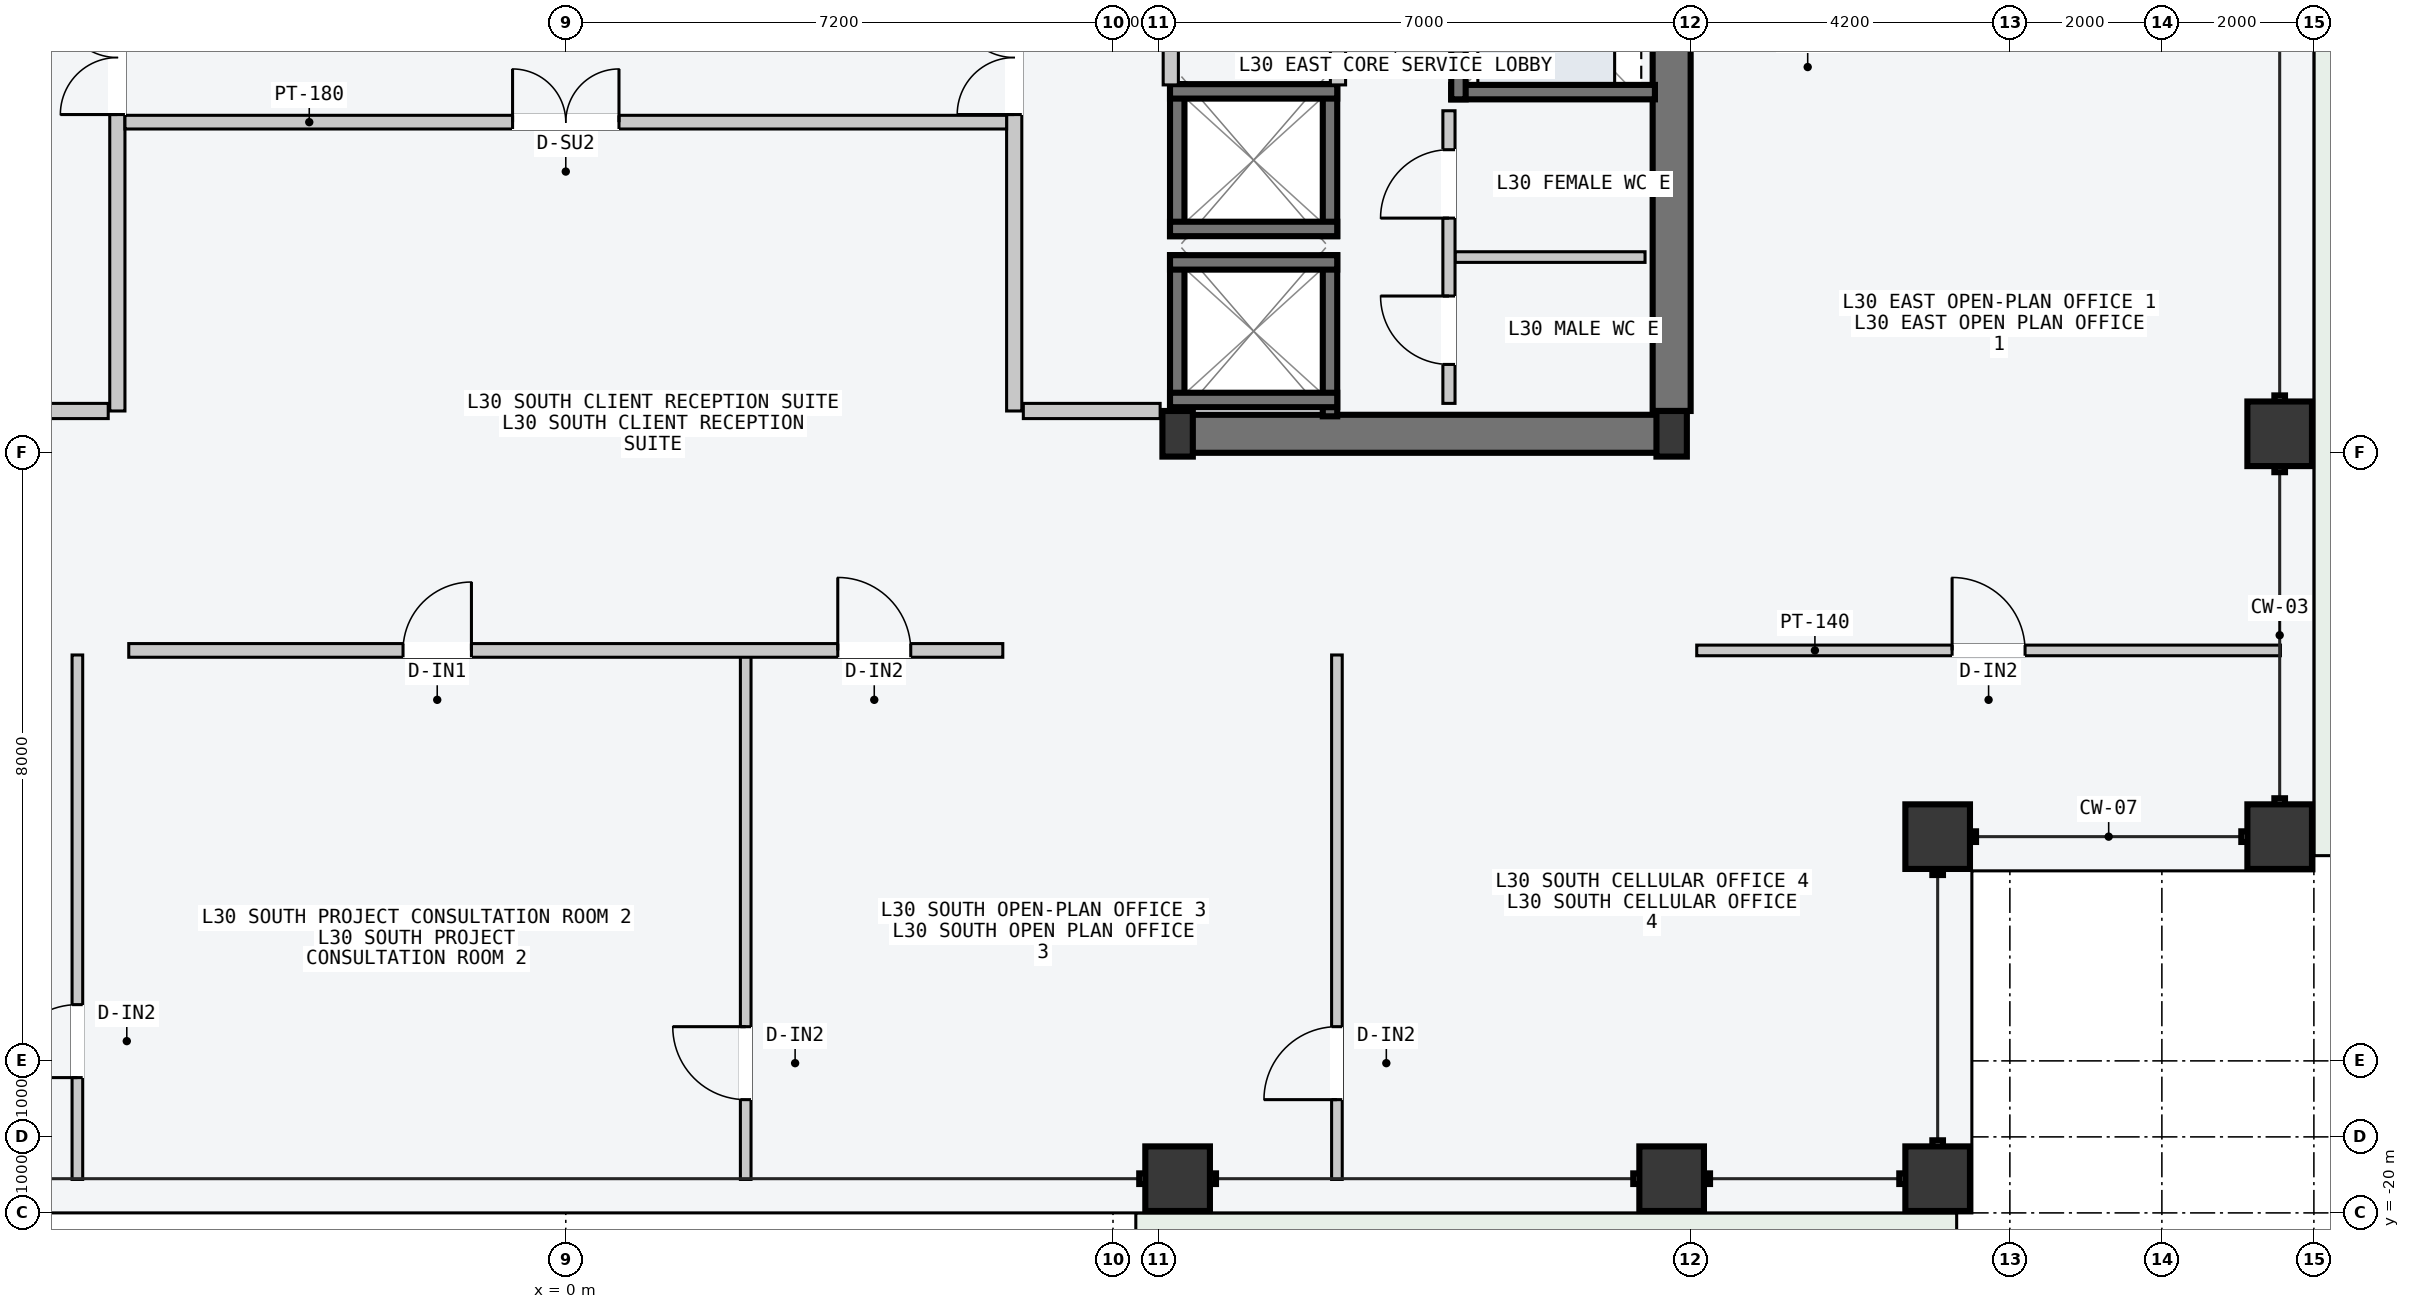
"""IFC4 building model, lengths in metres.
Left out: names, types, materials, properties, quantities, classifications, styles, units other than length and angle.
Written with IfcOpenShell. Run it as: python <this file> out.ifc"""

import sys

from ifc_helpers import new_model, si_unit, direction, frame, frame_2d, origin, origin_2d, place, context, subcontext, project, spatial, rectangle, hollow_rectangle, i_section, extrude, element, fill, save


model = new_model("IFC4")
c1 = context("Model", 3, precision=1e-05, world=origin(), true_north=direction((0.0, 1.0)))
c2 = subcontext(c1, "Body", "Model", "MODEL_VIEW")
j1 = project(units=[si_unit("LENGTHUNIT", "METRE"), si_unit("PLANEANGLEUNIT", "RADIAN")], contexts=[c1])
p1 = place(None, origin())
s1 = spatial("IfcSite", under=j1, at=p1, CompositionType="ELEMENT")
p2 = place(p1, origin())
s2 = spatial("IfcBuilding", under=s1, at=p2, CompositionType="ELEMENT")
p3 = place(p2, frame((0.0, 0.0, 117.0)))
s3 = spatial("IfcBuildingStorey", under=s2, at=p3, CompositionType="ELEMENT", Elevation=117.0)
p4 = place(p3, frame((8.07, -9.75, -0.2), z_axis=(0.0, 0.0, 1.0), x_axis=(1.0, 0.0, 0.0)))
e1 = element("IfcWall", 1, at=p4, inside=s3, PredefinedType="SHEAR", context=c2, shape_type="SweptSolid", body=[
    extrude(rectangle(XDim=6.46, YDim=0.5, at=frame_2d((3.23, 0.0))), origin(), (0.0, 0.0, 1.0), 3.6),
])
p5 = place(p3, frame((14.55, -9.45, -0.2), z_axis=(0.0, 0.0, 1.0), x_axis=(0.0, 1.0, 0.0)))
e2 = element("IfcWall", 2, at=p5, inside=s3, PredefinedType="SHEAR", context=c2, shape_type="SweptSolid", body=[
    extrude(rectangle(XDim=9.15, YDim=0.5, at=frame_2d((4.575, 0.0))), origin(), (0.0, 0.0, 1.0), 3.6),
])
for number, where, z_axis, x_axis in (
    (3, (8.05, -9.75, 0.0), (0.0, 0.0, 1.0), (1.0, 0.0, 0.0)),
    (4, (14.55, -9.75, 0.0), (0.0, 0.0, 1.0), (1.0, 0.0, 0.0)),
):
    element("IfcColumn", number, at=place(p3, frame(where, z_axis=z_axis, x_axis=x_axis)), inside=s3, PredefinedType="COLUMN", context=c2, shape_type="SweptSolid", body=[
        extrude(i_section(OverallWidth=0.4, OverallDepth=0.6, WebThickness=0.022, FlangeThickness=0.036, at=origin_2d()), origin(), (0.0, 0.0, 1.0), 3.6),
    ])
for number, where, z_axis, x_axis in (
    (5, (8.05, -19.55, 0.0), (0.0, 0.0, 1.0), (1.0, 0.0, 0.0)),
    (6, (14.55, -19.55, 0.0), (0.0, 0.0, 1.0), (1.0, 0.0, 0.0)),
    (7, (18.05, -19.55, 0.0), (0.0, 0.0, 1.0), (1.0, 0.0, 0.0)),
    (8, (22.55, -15.05, 0.0), (0.0, 0.0, 1.0), (0.0, 1.0, 0.0)),
    (9, (22.55, -9.75, 0.0), (0.0, 0.0, 1.0), (0.0, 1.0, 0.0)),
    (10, (18.05, -15.05, 0.0), (0.0, 0.0, 1.0), (1.0, 0.0, 0.0)),
):
    element("IfcColumn", number, at=place(p3, frame(where, z_axis=z_axis, x_axis=x_axis)), inside=s3, PredefinedType="COLUMN", context=c2, shape_type="SweptSolid", body=[
        extrude(hollow_rectangle(XDim=0.85, YDim=0.85, WallThickness=0.04, at=origin_2d()), origin(), (0.0, 0.0, 1.0), 3.6),
    ])
for number, where, z_axis, x_axis in (
    (11, (8.045, -9.52, -0.2), (0.0, 0.0, 1.0), (0.0, 1.0, 0.0)),
    (12, (10.055, -9.52, -0.2), (0.0, 0.0, 1.0), (0.0, 1.0, 0.0)),
):
    element("IfcWall", number, at=place(p3, frame(where, z_axis=z_axis, x_axis=x_axis)), inside=s3, PredefinedType="SOLIDWALL", context=c2, shape_type="SweptSolid", body=[
        extrude(rectangle(XDim=2.12, YDim=0.19, at=frame_2d((1.06, 0.0))), origin(), (0.0, 0.0, 1.0), 3.6),
    ])
for number, where, z_axis, x_axis in (
    (13, (7.95, -7.495, -0.2), (0.0, 0.0, 1.0), (1.0, 0.0, 0.0)),
    (14, (7.95, -9.305, -0.2), (0.0, 0.0, 1.0), (1.0, 0.0, 0.0)),
):
    element("IfcWall", number, at=place(p3, frame(where, z_axis=z_axis, x_axis=x_axis)), inside=s3, PredefinedType="SOLIDWALL", context=c2, shape_type="SweptSolid", body=[
        extrude(rectangle(XDim=2.2, YDim=0.19, at=frame_2d((1.1, 0.0))), origin(), (0.0, 0.0, 1.0), 3.6),
    ])
for number, where, z_axis, x_axis in (
    (15, (8.045, -7.15, -0.2), (0.0, 0.0, 1.0), (0.0, 1.0, 0.0)),
    (16, (10.055, -7.15, -0.2), (0.0, 0.0, 1.0), (0.0, 1.0, 0.0)),
):
    element("IfcWall", number, at=place(p3, frame(where, z_axis=z_axis, x_axis=x_axis)), inside=s3, PredefinedType="SOLIDWALL", context=c2, shape_type="SweptSolid", body=[
        extrude(rectangle(XDim=2.0, YDim=0.19, at=frame_2d((1.0, 0.0))), origin(), (0.0, 0.0, 1.0), 3.6),
    ])
for number, where, z_axis, x_axis in (
    (17, (7.95, -5.245, -0.2), (0.0, 0.0, 1.0), (1.0, 0.0, 0.0)),
    (18, (7.95, -7.055, -0.2), (0.0, 0.0, 1.0), (1.0, 0.0, 0.0)),
):
    element("IfcWall", number, at=place(p3, frame(where, z_axis=z_axis, x_axis=x_axis)), inside=s3, PredefinedType="SOLIDWALL", context=c2, shape_type="SweptSolid", body=[
        extrude(rectangle(XDim=2.2, YDim=0.19, at=frame_2d((1.1, 0.0))), origin(), (0.0, 0.0, 1.0), 3.6),
    ])
p6 = place(p3, frame((11.65, -5.255, -0.2), z_axis=(0.0, 0.0, 1.0), x_axis=(1.0, 0.0, 0.0)))
e19 = element("IfcWall", 19, at=p6, inside=s3, PredefinedType="SOLIDWALL", context=c2, shape_type="SweptSolid", body=[
    extrude(rectangle(XDim=2.68, YDim=0.19, at=frame_2d((1.34, 0.0))), origin(), (0.0, 0.0, 1.0), 3.6),
])
p7 = place(p3, frame((11.745, -5.35, -0.2), z_axis=(0.0, 0.0, 1.0), x_axis=(0.0, 1.0, 0.0)))
e20 = element("IfcWall", 20, at=p7, inside=s3, PredefinedType="SOLIDWALL", context=c2, shape_type="SweptSolid", body=[
    extrude(rectangle(XDim=2.6, YDim=0.19, at=frame_2d((1.3, 0.0))), origin(), (0.0, 0.0, 1.0), 3.6),
])
p8 = place(p3, frame((-5.9, -9.45, 0.0), z_axis=(0.0, 0.0, 1.0), x_axis=(0.0, 1.0, 0.0)))
e21 = element("IfcWall", 21, at=p8, inside=s3, PredefinedType="PARTITIONING", context=c2, shape_type="SweptSolid", body=[
    extrude(rectangle(XDim=10.5, YDim=0.2, at=frame_2d((5.25, 0.0))), origin(), (0.0, 0.0, 1.0), 3.4),
])
p9 = place(p8, frame((3.9, 0.0, 0.0)))
e22 = element("IfcOpeningElement", 22, at=p9, cuts=e21, PredefinedType="OPENING", context=c2, shape_type="SweptSolid", body=[
    extrude(rectangle(XDim=1.5, YDim=2.2, at=frame_2d((0.75, 1.1))), frame((0.0, 0.11, 0.0), z_axis=(0.0, -1.0, 0.0), x_axis=(1.0, 0.0, 0.0)), (0.0, 0.0, 1.0), 0.22),
])
p10 = place(p3, frame((-6.02, -9.45, 0.0), z_axis=(0.0, 0.0, 1.0), x_axis=(-1.0, 0.0, 0.0)))
e23 = element("IfcWall", 23, at=p10, inside=s3, PredefinedType="PARTITIONING", context=c2, shape_type="SweptSolid", body=[
    extrude(rectangle(XDim=1.8, YDim=0.2, at=frame_2d((0.9, 0.0))), origin(), (0.0, 0.0, 1.0), 3.4),
])
p11 = place(p3, frame((5.9, -9.45, 0.0), z_axis=(0.0, 0.0, 1.0), x_axis=(0.0, 1.0, 0.0)))
e24 = element("IfcWall", 24, at=p11, inside=s3, PredefinedType="PARTITIONING", context=c2, shape_type="SweptSolid", body=[
    extrude(rectangle(XDim=18.9, YDim=0.2, at=frame_2d((9.45, 0.0))), origin(), (0.0, 0.0, 1.0), 3.4),
])
p12 = place(p11, frame((3.9, 0.0, 0.0)))
e25 = element("IfcOpeningElement", 25, at=p12, cuts=e24, PredefinedType="OPENING", context=c2, shape_type="SweptSolid", body=[
    extrude(rectangle(XDim=1.5, YDim=2.2, at=frame_2d((0.75, 1.1))), frame((0.0, 0.11, 0.0), z_axis=(0.0, -1.0, 0.0), x_axis=(1.0, 0.0, 0.0)), (0.0, 0.0, 1.0), 0.22),
])
p13 = place(p3, frame((6.02, -9.45, 0.0), z_axis=(0.0, 0.0, 1.0), x_axis=(1.0, 0.0, 0.0)))
e26 = element("IfcWall", 26, at=p13, inside=s3, PredefinedType="PARTITIONING", context=c2, shape_type="SweptSolid", body=[
    extrude(rectangle(XDim=1.8, YDim=0.2, at=frame_2d((0.9, 0.0))), origin(), (0.0, 0.0, 1.0), 3.4),
])
for number, where, z_axis, x_axis in (
    (27, (7.96, -5.16, 0.0), (0.0, 0.0, 1.0), (0.0, 1.0, 0.0)),
    (28, (10.16, -5.16, 0.0), (0.0, 0.0, 1.0), (0.0, 1.0, 0.0)),
):
    element("IfcWall", number, at=place(p3, frame(where, z_axis=z_axis, x_axis=x_axis)), inside=s3, PredefinedType="PARTITIONING", context=c2, shape_type="SweptSolid", body=[
        extrude(rectangle(XDim=2.44, YDim=0.2, at=frame_2d((1.22, 0.0))), origin(), (0.0, 0.0, 1.0), 3.4),
    ])
p14 = place(p3, frame((11.7, -7.425, 0.0), z_axis=(0.0, 0.0, 1.0), x_axis=(1.0, 0.0, 0.0)))
e29 = element("IfcWall", 29, at=p14, inside=s3, PredefinedType="PARTITIONING", context=c2, shape_type="SweptSolid", body=[
    extrude(rectangle(XDim=2.5, YDim=0.14, at=frame_2d((1.25, 0.0))), origin(), (0.0, 0.0, 1.0), 3.4),
])
p15 = place(p3, frame((11.62, -9.35, 0.0), z_axis=(0.0, 0.0, 1.0), x_axis=(0.0, 1.0, 0.0)))
e30 = element("IfcWall", 30, at=p15, inside=s3, PredefinedType="PARTITIONING", context=c2, shape_type="SweptSolid", body=[
    extrude(rectangle(XDim=3.85, YDim=0.16, at=frame_2d((1.925, 0.0))), origin(), (0.0, 0.0, 1.0), 3.4),
])
p16 = place(p15, frame((0.512, 0.0, 0.0)))
e31 = element("IfcOpeningElement", 31, at=p16, cuts=e30, PredefinedType="OPENING", context=c2, shape_type="SweptSolid", body=[
    extrude(rectangle(XDim=0.9, YDim=2.15, at=frame_2d((0.45, 1.075))), frame((0.0, 0.09, 0.0), z_axis=(0.0, -1.0, 0.0), x_axis=(1.0, 0.0, 0.0)), (0.0, 0.0, 1.0), 0.18),
])
p17 = place(p15, frame((2.438, 0.0, 0.0)))
e32 = element("IfcOpeningElement", 32, at=p17, cuts=e30, PredefinedType="OPENING", context=c2, shape_type="SweptSolid", body=[
    extrude(rectangle(XDim=0.9, YDim=2.15, at=frame_2d((0.45, 1.075))), frame((0.0, 0.09, 0.0), z_axis=(0.0, -1.0, 0.0), x_axis=(1.0, 0.0, 0.0)), (0.0, 0.0, 1.0), 0.18),
])
p18 = place(p3, frame((-5.8, -5.65, 0.0), z_axis=(0.0, 0.0, 1.0), x_axis=(1.0, 0.0, 0.0)))
e33 = element("IfcWall", 33, at=p18, inside=s3, PredefinedType="PARTITIONING", context=c2, shape_type="SweptSolid", body=[
    extrude(rectangle(XDim=11.6, YDim=0.18, at=frame_2d((5.8, 0.0))), origin(), (0.0, 0.0, 1.0), 3.4),
])
p19 = place(p18, frame((5.1, 0.0, 0.0)))
e34 = element("IfcOpeningElement", 34, at=p19, cuts=e33, PredefinedType="OPENING", context=c2, shape_type="SweptSolid", body=[
    extrude(rectangle(XDim=1.4, YDim=2.2, at=frame_2d((0.7, 1.1))), frame((0.0, 0.1, 0.0), z_axis=(0.0, -1.0, 0.0), x_axis=(1.0, 0.0, 0.0)), (0.0, 0.0, 1.0), 0.2),
])
p20 = place(p3, frame((-6.426, -19.56, 0.0), z_axis=(0.0, 0.0, 1.0), x_axis=(0.0, 1.0, 0.0)))
e35 = element("IfcWall", 35, at=p20, inside=s3, PredefinedType="PARTITIONING", context=c2, shape_type="SweptSolid", body=[
    extrude(rectangle(XDim=6.9, YDim=0.14, at=frame_2d((3.45, 0.0))), origin(), (0.0, 0.0, 1.0), 3.4),
])
p21 = place(p20, frame((1.34, 0.0, 0.0)))
e36 = element("IfcOpeningElement", 36, at=p21, cuts=e35, PredefinedType="OPENING", context=c2, shape_type="SweptSolid", body=[
    extrude(rectangle(XDim=0.96, YDim=2.18, at=frame_2d((0.48, 1.09))), frame((0.0, 0.08, 0.0), z_axis=(0.0, -1.0, 0.0), x_axis=(1.0, 0.0, 0.0)), (0.0, 0.0, 1.0), 0.16),
])
p22 = place(p3, frame((2.367, -19.56, 0.0), z_axis=(0.0, 0.0, 1.0), x_axis=(0.0, 1.0, 0.0)))
e37 = element("IfcWall", 37, at=p22, inside=s3, PredefinedType="PARTITIONING", context=c2, shape_type="SweptSolid", body=[
    extrude(rectangle(XDim=6.9, YDim=0.14, at=frame_2d((3.45, 0.0))), origin(), (0.0, 0.0, 1.0), 3.4),
])
p23 = place(p22, frame((1.05, 0.0, 0.0)))
e38 = element("IfcOpeningElement", 38, at=p23, cuts=e37, PredefinedType="OPENING", context=c2, shape_type="SweptSolid", body=[
    extrude(rectangle(XDim=0.96, YDim=2.18, at=frame_2d((0.48, 1.09))), frame((0.0, 0.08, 0.0), z_axis=(0.0, -1.0, 0.0), x_axis=(1.0, 0.0, 0.0)), (0.0, 0.0, 1.0), 0.16),
])
p24 = place(p3, frame((10.146, -19.56, 0.0), z_axis=(0.0, 0.0, 1.0), x_axis=(0.0, 1.0, 0.0)))
e39 = element("IfcWall", 39, at=p24, inside=s3, PredefinedType="PARTITIONING", context=c2, shape_type="SweptSolid", body=[
    extrude(rectangle(XDim=6.9, YDim=0.14, at=frame_2d((3.45, 0.0))), origin(), (0.0, 0.0, 1.0), 3.4),
])
p25 = place(p24, frame((1.05, 0.0, 0.0)))
e40 = element("IfcOpeningElement", 40, at=p25, cuts=e39, PredefinedType="OPENING", context=c2, shape_type="SweptSolid", body=[
    extrude(rectangle(XDim=0.96, YDim=2.18, at=frame_2d((0.48, 1.09))), frame((0.0, 0.08, 0.0), z_axis=(0.0, -1.0, 0.0), x_axis=(1.0, 0.0, 0.0)), (0.0, 0.0, 1.0), 0.16),
])
p26 = place(p3, frame((-5.75, -12.6, 0.0), z_axis=(0.0, 0.0, 1.0), x_axis=(1.0, 0.0, 0.0)))
e41 = element("IfcWall", 41, at=p26, inside=s3, PredefinedType="PARTITIONING", context=c2, shape_type="SweptSolid", body=[
    extrude(rectangle(XDim=11.5, YDim=0.18, at=frame_2d((5.75, 0.0))), origin(), (0.0, 0.0, 1.0), 3.4),
])
p27 = place(p26, frame((3.609, 0.0, 0.0)))
e42 = element("IfcOpeningElement", 42, at=p27, cuts=e41, PredefinedType="OPENING", context=c2, shape_type="SweptSolid", body=[
    extrude(rectangle(XDim=0.9, YDim=2.15, at=frame_2d((0.45, 1.075))), frame((0.0, 0.1, 0.0), z_axis=(0.0, -1.0, 0.0), x_axis=(1.0, 0.0, 0.0)), (0.0, 0.0, 1.0), 0.2),
])
p28 = place(p26, frame((9.329, 0.0, 0.0)))
e43 = element("IfcOpeningElement", 43, at=p28, cuts=e41, PredefinedType="OPENING", context=c2, shape_type="SweptSolid", body=[
    extrude(rectangle(XDim=0.96, YDim=2.18, at=frame_2d((0.48, 1.09))), frame((0.0, 0.1, 0.0), z_axis=(0.0, -1.0, 0.0), x_axis=(1.0, 0.0, 0.0)), (0.0, 0.0, 1.0), 0.2),
])
p29 = place(p3, frame((14.88, -12.6, 0.0), z_axis=(0.0, 0.0, 1.0), x_axis=(1.0, 0.0, 0.0)))
e44 = element("IfcWall", 44, at=p29, inside=s3, PredefinedType="PARTITIONING", context=c2, shape_type="SweptSolid", body=[
    extrude(rectangle(XDim=7.68, YDim=0.14, at=frame_2d((3.84, 0.0))), origin(), (0.0, 0.0, 1.0), 3.4),
])
p30 = place(p29, frame((3.36, 0.0, 0.0)))
e45 = element("IfcOpeningElement", 45, at=p30, cuts=e44, PredefinedType="OPENING", context=c2, shape_type="SweptSolid", body=[
    extrude(rectangle(XDim=0.96, YDim=2.18, at=frame_2d((0.48, 1.09))), frame((0.0, 0.08, 0.0), z_axis=(0.0, -1.0, 0.0), x_axis=(1.0, 0.0, 0.0)), (0.0, 0.0, 1.0), 0.16),
])
p31 = place(p9, origin())
e46 = element("IfcDoor", 46, at=p31, inside=s3, OperationType="DOUBLE_DOOR_SINGLE_SWING", PredefinedType="DOOR", context=c2, shape_type="SweptSolid", body=[
    extrude(rectangle(XDim=1.5, YDim=2.2, at=frame_2d((0.75, 1.1))), frame((0.0, 0.025, 0.0), z_axis=(0.0, -1.0, 0.0), x_axis=(1.0, 0.0, 0.0)), (0.0, 0.0, 1.0), 0.05),
])
fill(e22, e46)
p32 = place(p12, origin())
e47 = element("IfcDoor", 47, at=p32, inside=s3, OperationType="DOUBLE_DOOR_SINGLE_SWING", PredefinedType="DOOR", context=c2, shape_type="SweptSolid", body=[
    extrude(rectangle(XDim=1.5, YDim=2.2, at=frame_2d((0.75, 1.1))), frame((0.0, 0.025, 0.0), z_axis=(0.0, -1.0, 0.0), x_axis=(1.0, 0.0, 0.0)), (0.0, 0.0, 1.0), 0.05),
])
fill(e25, e47)
p33 = place(p16, origin())
e48 = element("IfcDoor", 48, at=p33, inside=s3, OperationType="SINGLE_SWING_RIGHT", PredefinedType="DOOR", context=c2, shape_type="SweptSolid", body=[
    extrude(rectangle(XDim=0.9, YDim=2.15, at=frame_2d((0.45, 1.075))), frame((0.0, 0.025, 0.0), z_axis=(0.0, -1.0, 0.0), x_axis=(1.0, 0.0, 0.0)), (0.0, 0.0, 1.0), 0.05),
])
fill(e31, e48)
p34 = place(p17, origin())
e49 = element("IfcDoor", 49, at=p34, inside=s3, OperationType="SINGLE_SWING_LEFT", PredefinedType="DOOR", context=c2, shape_type="SweptSolid", body=[
    extrude(rectangle(XDim=0.9, YDim=2.15, at=frame_2d((0.45, 1.075))), frame((0.0, 0.025, 0.0), z_axis=(0.0, -1.0, 0.0), x_axis=(1.0, 0.0, 0.0)), (0.0, 0.0, 1.0), 0.05),
])
fill(e32, e49)
p35 = place(p19, origin())
e50 = element("IfcDoor", 50, at=p35, inside=s3, OperationType="DOUBLE_DOOR_SINGLE_SWING", PredefinedType="DOOR", context=c2, shape_type="SweptSolid", body=[
    extrude(rectangle(XDim=1.4, YDim=2.2, at=frame_2d((0.7, 1.1))), frame((0.0, 0.025, 0.0), z_axis=(0.0, -1.0, 0.0), x_axis=(1.0, 0.0, 0.0)), (0.0, 0.0, 1.0), 0.05),
])
fill(e34, e50)
p36 = place(p21, origin())
e51 = element("IfcDoor", 51, at=p36, inside=s3, OperationType="SINGLE_SWING_LEFT", PredefinedType="DOOR", context=c2, shape_type="SweptSolid", body=[
    extrude(rectangle(XDim=0.96, YDim=2.18, at=frame_2d((0.48, 1.09))), frame((0.0, 0.025, 0.0), z_axis=(0.0, -1.0, 0.0), x_axis=(1.0, 0.0, 0.0)), (0.0, 0.0, 1.0), 0.05),
])
fill(e36, e51)
p37 = place(p23, origin())
e52 = element("IfcDoor", 52, at=p37, inside=s3, OperationType="SINGLE_SWING_RIGHT", PredefinedType="DOOR", context=c2, shape_type="SweptSolid", body=[
    extrude(rectangle(XDim=0.96, YDim=2.18, at=frame_2d((0.48, 1.09))), frame((0.0, 0.025, 0.0), z_axis=(0.0, -1.0, 0.0), x_axis=(1.0, 0.0, 0.0)), (0.0, 0.0, 1.0), 0.05),
])
fill(e38, e52)
p38 = place(p25, origin())
e53 = element("IfcDoor", 53, at=p38, inside=s3, OperationType="SINGLE_SWING_LEFT", PredefinedType="DOOR", context=c2, shape_type="SweptSolid", body=[
    extrude(rectangle(XDim=0.96, YDim=2.18, at=frame_2d((0.48, 1.09))), frame((0.0, 0.025, 0.0), z_axis=(0.0, -1.0, 0.0), x_axis=(1.0, 0.0, 0.0)), (0.0, 0.0, 1.0), 0.05),
])
fill(e40, e53)
p39 = place(p27, origin())
e54 = element("IfcDoor", 54, at=p39, inside=s3, OperationType="SINGLE_SWING_RIGHT", PredefinedType="DOOR", context=c2, shape_type="SweptSolid", body=[
    extrude(rectangle(XDim=0.9, YDim=2.15, at=frame_2d((0.45, 1.075))), frame((0.0, 0.025, 0.0), z_axis=(0.0, -1.0, 0.0), x_axis=(1.0, 0.0, 0.0)), (0.0, 0.0, 1.0), 0.05),
])
fill(e42, e54)
p40 = place(p28, origin())
e55 = element("IfcDoor", 55, at=p40, inside=s3, OperationType="SINGLE_SWING_LEFT", PredefinedType="DOOR", context=c2, shape_type="SweptSolid", body=[
    extrude(rectangle(XDim=0.96, YDim=2.18, at=frame_2d((0.48, 1.09))), frame((0.0, 0.025, 0.0), z_axis=(0.0, -1.0, 0.0), x_axis=(1.0, 0.0, 0.0)), (0.0, 0.0, 1.0), 0.05),
])
fill(e43, e55)
p41 = place(p30, origin())
e56 = element("IfcDoor", 56, at=p41, inside=s3, OperationType="SINGLE_SWING_LEFT", PredefinedType="DOOR", context=c2, shape_type="SweptSolid", body=[
    extrude(rectangle(XDim=0.96, YDim=2.18, at=frame_2d((0.48, 1.09))), frame((0.0, 0.025, 0.0), z_axis=(0.0, -1.0, 0.0), x_axis=(1.0, 0.0, 0.0)), (0.0, 0.0, 1.0), 0.05),
])
fill(e45, e56)
save(model, sys.argv[1])
